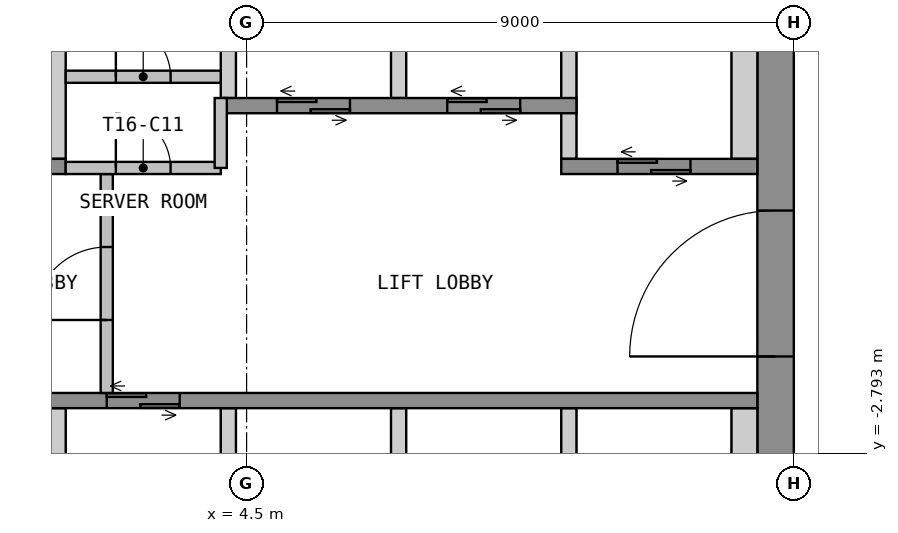
"""IFC4 building model, lengths in metres.
Left out: names, types, materials, properties, quantities, classifications, styles, units other than length and angle.
Written with IfcOpenShell. Run it as: python <this file> out.ifc"""

import sys

from ifc_helpers import new_model, si_unit, direction, frame, frame_2d, origin, place, context, subcontext, project, spatial, polyline, rectangle, outline, extrude, element, fill, save


model = new_model("IFC4")
c1 = context("Model", 3, precision=1e-05, world=origin(), true_north=direction((0.0, 1.0)))
c2 = subcontext(c1, "Body", "Model", "MODEL_VIEW")
j1 = project(units=[si_unit("LENGTHUNIT", "METRE"), si_unit("PLANEANGLEUNIT", "RADIAN")], contexts=[c1])
p1 = place(None, origin())
s1 = spatial("IfcSite", under=j1, at=p1, CompositionType="ELEMENT")
p2 = place(p1, origin())
s2 = spatial("IfcBuilding", under=s1, at=p2, CompositionType="ELEMENT")
p3 = place(p2, frame((0.0, 0.0, 219.0)))
s3 = spatial("IfcBuildingStorey", under=s2, at=p3, CompositionType="ELEMENT", Elevation=219.0)
p4 = place(p3, frame((13.2, -10.65, 0.0), z_axis=(0.0, 0.0, 1.0), x_axis=(0.0, 1.0, 0.0)))
e1 = element("IfcWall", 1, at=p4, inside=s3, PredefinedType="SHEAR", context=c2, shape_type="SweptSolid", body=[
    extrude(rectangle(XDim=21.3, YDim=0.6, at=frame_2d((10.65, 0.0))), origin(), (0.0, 0.0, 1.0), 3.55),
])
p5 = place(p4, frame((9.45, 0.0, 0.0)))
e2 = element("IfcOpeningElement", 2, at=p5, cuts=e1, PredefinedType="OPENING", context=c2, shape_type="SweptSolid", body=[
    extrude(rectangle(XDim=2.4, YDim=2.1, at=frame_2d((1.2, 1.05))), frame((0.0, 0.31, 0.0), z_axis=(0.0, -1.0, 0.0), x_axis=(1.0, 0.0, 0.0)), (0.0, 0.0, 1.0), 0.62),
])
p6 = place(p3, origin())
e3 = element("IfcWall", 3, at=p6, inside=s3, PredefinedType="SHEAR", context=c2, shape_type="SweptSolid", body=[
    extrude(outline(polyline([(1.275, 2.05), (1.525, 2.05), (1.525, 4.75), (1.275, 4.75), (1.275, 2.05)])), origin(), (0.0, 0.0, 1.0), 3.55),
])
p7 = place(p3, origin())
e4 = element("IfcWall", 4, at=p7, inside=s3, PredefinedType="SHEAR", context=c2, shape_type="SweptSolid", body=[
    extrude(outline(polyline([(9.675, 2.05), (9.925, 2.05), (9.925, 4.75), (9.675, 4.75), (9.675, 2.05)])), origin(), (0.0, 0.0, 1.0), 3.55),
])
p8 = place(p3, origin())
e5 = element("IfcWall", 5, at=p8, inside=s3, PredefinedType="SHEAR", context=c2, shape_type="SweptSolid", body=[
    extrude(outline(polyline([(12.475, 2.05), (12.9, 2.05), (12.9, 4.75), (12.475, 4.75), (12.475, 2.05)])), origin(), (0.0, 0.0, 1.0), 3.55),
])
p9 = place(p3, origin())
e6 = element("IfcWall", 6, at=p9, inside=s3, PredefinedType="SHEAR", context=c2, shape_type="SweptSolid", body=[
    extrude(outline(polyline([(4.075, 3.05), (4.325, 3.05), (4.325, 4.75), (4.075, 4.75), (4.075, 3.05)])), origin(), (0.0, 0.0, 1.0), 3.55),
])
p10 = place(p3, origin())
e7 = element("IfcWall", 7, at=p10, inside=s3, PredefinedType="SHEAR", context=c2, shape_type="SweptSolid", body=[
    extrude(outline(polyline([(6.875, 3.05), (7.125, 3.05), (7.125, 4.75), (6.875, 4.75), (6.875, 3.05)])), origin(), (0.0, 0.0, 1.0), 3.55),
])
p11 = place(p3, frame((-1.525, 1.925, 0.0), z_axis=(0.0, 0.0, 1.0), x_axis=(1.0, 0.0, 0.0)))
e8 = element("IfcWall", 8, at=p11, inside=s3, PredefinedType="SHEAR", context=c2, shape_type="SweptSolid", body=[
    extrude(rectangle(XDim=3.05, YDim=0.25, at=frame_2d((1.525, 0.0))), origin(), (0.0, 0.0, 1.0), 3.55),
])
p12 = place(p11, frame((0.925, 0.0, 0.0)))
e9 = element("IfcOpeningElement", 9, at=p12, cuts=e8, PredefinedType="OPENING", context=c2, shape_type="SweptSolid", body=[
    extrude(rectangle(XDim=1.2, YDim=2.1, at=frame_2d((0.6, 1.05))), frame((0.0, 0.135, 0.0), z_axis=(0.0, -1.0, 0.0), x_axis=(1.0, 0.0, 0.0)), (0.0, 0.0, 1.0), 0.27),
])
p13 = place(p3, frame((4.075, 2.925, 0.0), z_axis=(0.0, 0.0, 1.0), x_axis=(1.0, 0.0, 0.0)))
e10 = element("IfcWall", 10, at=p13, inside=s3, PredefinedType="SHEAR", context=c2, shape_type="SweptSolid", body=[
    extrude(rectangle(XDim=5.85, YDim=0.25, at=frame_2d((2.925, 0.0))), origin(), (0.0, 0.0, 1.0), 3.55),
])
p14 = place(p13, frame((0.925, 0.0, 0.0)))
e11 = element("IfcOpeningElement", 11, at=p14, cuts=e10, PredefinedType="OPENING", context=c2, shape_type="SweptSolid", body=[
    extrude(rectangle(XDim=1.2, YDim=2.1, at=frame_2d((0.6, 1.05))), frame((0.0, 0.135, 0.0), z_axis=(0.0, -1.0, 0.0), x_axis=(1.0, 0.0, 0.0)), (0.0, 0.0, 1.0), 0.27),
])
p15 = place(p13, frame((3.725, 0.0, 0.0)))
e12 = element("IfcOpeningElement", 12, at=p15, cuts=e10, PredefinedType="OPENING", context=c2, shape_type="SweptSolid", body=[
    extrude(rectangle(XDim=1.2, YDim=2.1, at=frame_2d((0.6, 1.05))), frame((0.0, 0.135, 0.0), z_axis=(0.0, -1.0, 0.0), x_axis=(1.0, 0.0, 0.0)), (0.0, 0.0, 1.0), 0.27),
])
p16 = place(p3, frame((9.675, 1.925, 0.0), z_axis=(0.0, 0.0, 1.0), x_axis=(1.0, 0.0, 0.0)))
e13 = element("IfcWall", 13, at=p16, inside=s3, PredefinedType="SHEAR", context=c2, shape_type="SweptSolid", body=[
    extrude(rectangle(XDim=3.225, YDim=0.25, at=frame_2d((1.612, 0.0))), origin(), (0.0, 0.0, 1.0), 3.55),
])
p17 = place(p16, frame((0.925, 0.0, 0.0)))
e14 = element("IfcOpeningElement", 14, at=p17, cuts=e13, PredefinedType="OPENING", context=c2, shape_type="SweptSolid", body=[
    extrude(rectangle(XDim=1.2, YDim=2.1, at=frame_2d((0.6, 1.05))), frame((0.0, 0.135, 0.0), z_axis=(0.0, -1.0, 0.0), x_axis=(1.0, 0.0, 0.0)), (0.0, 0.0, 1.0), 0.27),
])
p18 = place(p3, origin())
e15 = element("IfcWall", 15, at=p18, inside=s3, PredefinedType="SHEAR", context=c2, shape_type="SweptSolid", body=[
    extrude(outline(polyline([(1.275, -4.75), (1.525, -4.75), (1.525, -2.05), (1.275, -2.05), (1.275, -4.75)])), origin(), (0.0, 0.0, 1.0), 3.55),
])
p19 = place(p3, origin())
e16 = element("IfcWall", 16, at=p19, inside=s3, PredefinedType="SHEAR", context=c2, shape_type="SweptSolid", body=[
    extrude(outline(polyline([(4.075, -4.75), (4.325, -4.75), (4.325, -2.05), (4.075, -2.05), (4.075, -4.75)])), origin(), (0.0, 0.0, 1.0), 3.55),
])
p20 = place(p3, origin())
e17 = element("IfcWall", 17, at=p20, inside=s3, PredefinedType="SHEAR", context=c2, shape_type="SweptSolid", body=[
    extrude(outline(polyline([(6.875, -4.75), (7.125, -4.75), (7.125, -2.05), (6.875, -2.05), (6.875, -4.75)])), origin(), (0.0, 0.0, 1.0), 3.55),
])
p21 = place(p3, origin())
e18 = element("IfcWall", 18, at=p21, inside=s3, PredefinedType="SHEAR", context=c2, shape_type="SweptSolid", body=[
    extrude(outline(polyline([(9.675, -4.75), (9.925, -4.75), (9.925, -2.05), (9.675, -2.05), (9.675, -4.75)])), origin(), (0.0, 0.0, 1.0), 3.55),
])
p22 = place(p3, origin())
e19 = element("IfcWall", 19, at=p22, inside=s3, PredefinedType="SHEAR", context=c2, shape_type="SweptSolid", body=[
    extrude(outline(polyline([(12.475, -4.75), (12.9, -4.75), (12.9, -2.05), (12.475, -2.05), (12.475, -4.75)])), origin(), (0.0, 0.0, 1.0), 3.55),
])
p23 = place(p3, frame((-1.525, -1.925, 0.0), z_axis=(0.0, 0.0, 1.0), x_axis=(1.0, 0.0, 0.0)))
e20 = element("IfcWall", 20, at=p23, inside=s3, PredefinedType="SHEAR", context=c2, shape_type="SweptSolid", body=[
    extrude(rectangle(XDim=14.425, YDim=0.25, at=frame_2d((7.212, 0.0))), origin(), (0.0, 0.0, 1.0), 3.55),
])
p24 = place(p23, frame((0.925, 0.0, 0.0)))
e21 = element("IfcOpeningElement", 21, at=p24, cuts=e20, PredefinedType="OPENING", context=c2, shape_type="SweptSolid", body=[
    extrude(rectangle(XDim=1.2, YDim=2.1, at=frame_2d((0.6, 1.05))), frame((0.0, 0.135, 0.0), z_axis=(0.0, -1.0, 0.0), x_axis=(1.0, 0.0, 0.0)), (0.0, 0.0, 1.0), 0.27),
])
p25 = place(p23, frame((3.725, 0.0, 0.0)))
e22 = element("IfcOpeningElement", 22, at=p25, cuts=e20, PredefinedType="OPENING", context=c2, shape_type="SweptSolid", body=[
    extrude(rectangle(XDim=1.2, YDim=2.1, at=frame_2d((0.6, 1.05))), frame((0.0, 0.135, 0.0), z_axis=(0.0, -1.0, 0.0), x_axis=(1.0, 0.0, 0.0)), (0.0, 0.0, 1.0), 0.27),
])
p26 = place(p3, frame((2.2, -1.8, 0.0), z_axis=(0.0, 0.0, 1.0), x_axis=(0.0, 1.0, 0.0)))
e23 = element("IfcWall", 23, at=p26, inside=s3, PredefinedType="PARTITIONING", context=c2, shape_type="SweptSolid", body=[
    extrude(rectangle(XDim=3.6, YDim=0.2, at=frame_2d((1.8, 0.0))), origin(), (0.0, 0.0, 1.0), 3.55),
])
p27 = place(p26, frame((1.2, 0.0, 0.0)))
e24 = element("IfcOpeningElement", 24, at=p27, cuts=e23, PredefinedType="OPENING", context=c2, shape_type="SweptSolid", body=[
    extrude(rectangle(XDim=1.2, YDim=2.1, at=frame_2d((0.6, 1.05))), frame((0.0, 0.11, 0.0), z_axis=(0.0, -1.0, 0.0), x_axis=(1.0, 0.0, 0.0)), (0.0, 0.0, 1.0), 0.22),
])
p28 = place(p3, frame((1.525, 3.4, 0.0), z_axis=(0.0, 0.0, 1.0), x_axis=(1.0, 0.0, 0.0)))
e25 = element("IfcWall", 25, at=p28, inside=s3, PredefinedType="PARTITIONING", context=c2, shape_type="SweptSolid", body=[
    extrude(rectangle(XDim=2.55, YDim=0.2, at=frame_2d((1.275, 0.0))), origin(), (0.0, 0.0, 1.0), 3.55),
])
p29 = place(p28, frame((0.825, 0.0, 0.0)))
e26 = element("IfcOpeningElement", 26, at=p29, cuts=e25, PredefinedType="OPENING", context=c2, shape_type="SweptSolid", body=[
    extrude(rectangle(XDim=0.9, YDim=2.1, at=frame_2d((0.45, 1.05))), frame((0.0, 0.11, 0.0), z_axis=(0.0, -1.0, 0.0), x_axis=(1.0, 0.0, 0.0)), (0.0, 0.0, 1.0), 0.22),
])
p30 = place(p3, frame((1.525, 1.9, 0.0), z_axis=(0.0, 0.0, 1.0), x_axis=(1.0, 0.0, 0.0)))
e27 = element("IfcWall", 27, at=p30, inside=s3, PredefinedType="PARTITIONING", context=c2, shape_type="SweptSolid", body=[
    extrude(rectangle(XDim=2.55, YDim=0.2, at=frame_2d((1.275, 0.0))), origin(), (0.0, 0.0, 1.0), 3.55),
])
p31 = place(p30, frame((0.825, 0.0, 0.0)))
e28 = element("IfcOpeningElement", 28, at=p31, cuts=e27, PredefinedType="OPENING", context=c2, shape_type="SweptSolid", body=[
    extrude(rectangle(XDim=0.9, YDim=2.1, at=frame_2d((0.45, 1.05))), frame((0.0, 0.11, 0.0), z_axis=(0.0, -1.0, 0.0), x_axis=(1.0, 0.0, 0.0)), (0.0, 0.0, 1.0), 0.22),
])
p32 = place(p3, frame((4.075, 1.9, 0.0), z_axis=(0.0, 0.0, 1.0), x_axis=(0.0, 1.0, 0.0)))
e29 = element("IfcWall", 29, at=p32, inside=s3, PredefinedType="PARTITIONING", context=c2, shape_type="SweptSolid", body=[
    extrude(rectangle(XDim=1.15, YDim=0.2, at=frame_2d((0.575, 0.0))), origin(), (0.0, 0.0, 1.0), 3.55),
])
p33 = place(p5, origin())
e30 = element("IfcDoor", 30, at=p33, inside=s3, OperationType="DOUBLE_DOOR_DOUBLE_SWING", PredefinedType="DOOR", context=c2, shape_type="SweptSolid", body=[
    extrude(rectangle(XDim=2.4, YDim=2.1, at=frame_2d((1.2, 1.05))), frame((0.0, 0.025, 0.0), z_axis=(0.0, -1.0, 0.0), x_axis=(1.0, 0.0, 0.0)), (0.0, 0.0, 1.0), 0.05),
])
fill(e2, e30)
p34 = place(p14, origin())
e31 = element("IfcDoor", 31, at=p34, inside=s3, OperationType="DOUBLE_DOOR_SLIDING", PredefinedType="DOOR", context=c2, shape_type="SweptSolid", body=[
    extrude(rectangle(XDim=1.2, YDim=2.1, at=frame_2d((0.6, 1.05))), frame((0.0, 0.025, 0.0), z_axis=(0.0, -1.0, 0.0), x_axis=(1.0, 0.0, 0.0)), (0.0, 0.0, 1.0), 0.05),
])
fill(e11, e31)
p35 = place(p15, origin())
e32 = element("IfcDoor", 32, at=p35, inside=s3, OperationType="DOUBLE_DOOR_SLIDING", PredefinedType="DOOR", context=c2, shape_type="SweptSolid", body=[
    extrude(rectangle(XDim=1.2, YDim=2.1, at=frame_2d((0.6, 1.05))), frame((0.0, 0.025, 0.0), z_axis=(0.0, -1.0, 0.0), x_axis=(1.0, 0.0, 0.0)), (0.0, 0.0, 1.0), 0.05),
])
fill(e12, e32)
p36 = place(p17, origin())
e33 = element("IfcDoor", 33, at=p36, inside=s3, OperationType="DOUBLE_DOOR_SLIDING", PredefinedType="DOOR", context=c2, shape_type="SweptSolid", body=[
    extrude(rectangle(XDim=1.2, YDim=2.1, at=frame_2d((0.6, 1.05))), frame((0.0, 0.025, 0.0), z_axis=(0.0, -1.0, 0.0), x_axis=(1.0, 0.0, 0.0)), (0.0, 0.0, 1.0), 0.05),
])
fill(e14, e33)
p37 = place(p25, origin())
e34 = element("IfcDoor", 34, at=p37, inside=s3, OperationType="DOUBLE_DOOR_SLIDING", PredefinedType="DOOR", context=c2, shape_type="SweptSolid", body=[
    extrude(rectangle(XDim=1.2, YDim=2.1, at=frame_2d((0.6, 1.05))), frame((0.0, 0.025, 0.0), z_axis=(0.0, -1.0, 0.0), x_axis=(1.0, 0.0, 0.0)), (0.0, 0.0, 1.0), 0.05),
])
fill(e22, e34)
p38 = place(p27, origin())
e35 = element("IfcDoor", 35, at=p38, inside=s3, OperationType="SINGLE_SWING_LEFT", PredefinedType="DOOR", context=c2, shape_type="SweptSolid", body=[
    extrude(rectangle(XDim=1.2, YDim=2.1, at=frame_2d((0.6, 1.05))), frame((0.0, 0.025, 0.0), z_axis=(0.0, -1.0, 0.0), x_axis=(1.0, 0.0, 0.0)), (0.0, 0.0, 1.0), 0.05),
])
fill(e24, e35)
p39 = place(p29, origin())
e36 = element("IfcDoor", 36, at=p39, inside=s3, OperationType="SINGLE_SWING_LEFT", PredefinedType="DOOR", context=c2, shape_type="SweptSolid", body=[
    extrude(rectangle(XDim=0.9, YDim=2.1, at=frame_2d((0.45, 1.05))), frame((0.0, 0.025, 0.0), z_axis=(0.0, -1.0, 0.0), x_axis=(1.0, 0.0, 0.0)), (0.0, 0.0, 1.0), 0.05),
])
fill(e26, e36)
p40 = place(p31, origin())
e37 = element("IfcDoor", 37, at=p40, inside=s3, OperationType="SINGLE_SWING_LEFT", PredefinedType="DOOR", context=c2, shape_type="SweptSolid", body=[
    extrude(rectangle(XDim=0.9, YDim=2.1, at=frame_2d((0.45, 1.05))), frame((0.0, 0.025, 0.0), z_axis=(0.0, -1.0, 0.0), x_axis=(1.0, 0.0, 0.0)), (0.0, 0.0, 1.0), 0.05),
])
fill(e28, e37)
save(model, sys.argv[1])
